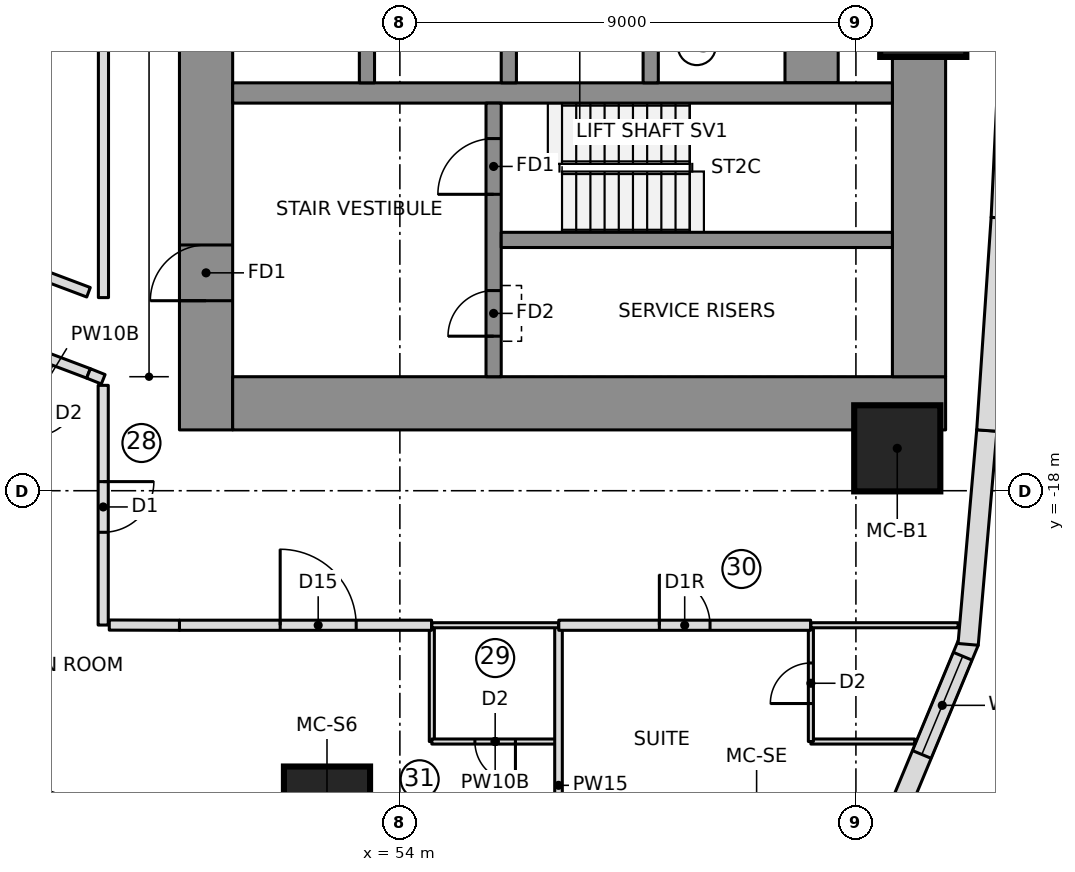
"""IFC4 building model, lengths in metres.
Left out: names, types, materials, properties, quantities, classifications, styles, units other than length and angle.
Written with IfcOpenShell. Run it as: python <this file> out.ifc"""

import sys

from ifc_helpers import new_model, si_unit, direction, frame, frame_2d, origin, origin_2d, place, context, subcontext, project, spatial, polyline, rectangle, outline, extrude, element, fill, save


model = new_model("IFC4")
c1 = context("Model", 3, precision=1e-05, world=origin(), true_north=direction((0.0, 1.0)))
c2 = subcontext(c1, "Body", "Model", "MODEL_VIEW")
j1 = project(units=[si_unit("LENGTHUNIT", "METRE"), si_unit("PLANEANGLEUNIT", "RADIAN")], contexts=[c1])
p1 = place(None, origin())
s1 = spatial("IfcSite", under=j1, at=p1, CompositionType="ELEMENT")
p2 = place(p1, origin())
s2 = spatial("IfcBuilding", under=s1, at=p2, CompositionType="ELEMENT")
p3 = place(p2, frame((0.0, 0.0, 109.75)))
s3 = spatial("IfcBuildingStorey", under=s2, at=p3, CompositionType="ELEMENT", Elevation=109.75)
p4 = place(p3, frame((50.175, -16.8, 0.0), z_axis=(0.0, 0.0, 1.0), x_axis=(0.0, 1.0, 0.0)))
e1 = element("IfcWall", 1, at=p4, inside=s3, PredefinedType="SHEAR", context=c2, shape_type="SweptSolid", body=[
    extrude(rectangle(XDim=10.15, YDim=1.05, at=frame_2d((5.075, 0.0))), origin(), (0.0, 0.0, 1.0), 3.55),
])
p5 = place(p4, frame((2.55, 0.0, 0.0)))
e2 = element("IfcOpeningElement", 2, at=p5, cuts=e1, PredefinedType="OPENING", context=c2, shape_type="SweptSolid", body=[
    extrude(rectangle(XDim=1.1, YDim=2.1, at=frame_2d((0.55, 1.05))), frame((0.0, 0.535, 0.0), z_axis=(0.0, -1.0, 0.0), x_axis=(1.0, 0.0, 0.0)), (0.0, 0.0, 1.0), 1.07),
])
p6 = place(p3, frame((50.7, -16.275, 0.0), z_axis=(0.0, 0.0, 1.0), x_axis=(1.0, 0.0, 0.0)))
e3 = element("IfcWall", 3, at=p6, inside=s3, PredefinedType="SHEAR", context=c2, shape_type="SweptSolid", body=[
    extrude(rectangle(XDim=14.07, YDim=1.05, at=frame_2d((7.035, 0.0))), origin(), (0.0, 0.0, 1.0), 3.55),
])
p7 = place(p3, frame((64.245, -15.75, 0.0), z_axis=(0.0, 0.0, 1.0), x_axis=(0.0, 1.0, 0.0)))
e4 = element("IfcWall", 4, at=p7, inside=s3, PredefinedType="SHEAR", context=c2, shape_type="SweptSolid", body=[
    extrude(rectangle(XDim=6.361, YDim=1.05, at=frame_2d((3.181, 0.0))), origin(), (0.0, 0.0, 1.0), 3.55),
])
p8 = place(p3, frame((62.125, -9.95, 0.0), z_axis=(0.0, 0.0, 1.0), x_axis=(0.0, 1.0, 0.0)))
e5 = element("IfcWall", 5, at=p8, inside=s3, PredefinedType="SHEAR", context=c2, shape_type="SweptSolid", body=[
    extrude(rectangle(XDim=19.9, YDim=1.05, at=frame_2d((9.95, 0.0))), origin(), (0.0, 0.0, 1.0), 3.55),
])
p9 = place(p3, frame((50.7, -10.15, 0.0), z_axis=(0.0, 0.0, 1.0), x_axis=(1.0, 0.0, 0.0)))
e6 = element("IfcWall", 6, at=p9, inside=s3, PredefinedType="SHEAR", context=c2, shape_type="SweptSolid", body=[
    extrude(rectangle(XDim=13.02, YDim=0.4, at=frame_2d((6.51, 0.0))), origin(), (0.0, 0.0, 1.0), 3.55),
])
for number, where, z_axis, x_axis in (
    (7, (53.35, -9.95, 0.0), (0.0, 0.0, 1.0), (0.0, 1.0, 0.0)),
    (8, (56.15, -9.95, 0.0), (0.0, 0.0, 1.0), (0.0, 1.0, 0.0)),
    (9, (58.95, -9.95, 0.0), (0.0, 0.0, 1.0), (0.0, 1.0, 0.0)),
):
    element("IfcWall", number, at=place(p3, frame(where, z_axis=z_axis, x_axis=x_axis)), inside=s3, PredefinedType="SHEAR", context=c2, shape_type="SweptSolid", body=[
        extrude(rectangle(XDim=3.0, YDim=0.3, at=frame_2d((1.5, 0.0))), origin(), (0.0, 0.0, 1.0), 3.55),
    ])
p10 = place(p3, frame((55.85, -15.75, 0.0), z_axis=(0.0, 0.0, 1.0), x_axis=(0.0, 1.0, 0.0)))
e10 = element("IfcWall", 10, at=p10, inside=s3, PredefinedType="SHEAR", context=c2, shape_type="SweptSolid", body=[
    extrude(rectangle(XDim=5.4, YDim=0.3, at=frame_2d((2.7, 0.0))), origin(), (0.0, 0.0, 1.0), 3.55),
])
p11 = place(p10, frame((3.6, 0.0, 0.0)))
e11 = element("IfcOpeningElement", 11, at=p11, cuts=e10, PredefinedType="OPENING", context=c2, shape_type="SweptSolid", body=[
    extrude(rectangle(XDim=1.1, YDim=2.1, at=frame_2d((0.55, 1.05))), frame((0.0, 0.16, 0.0), z_axis=(0.0, -1.0, 0.0), x_axis=(1.0, 0.0, 0.0)), (0.0, 0.0, 1.0), 0.32),
])
p12 = place(p10, frame((0.8, 0.0, 0.0)))
e12 = element("IfcOpeningElement", 12, at=p12, cuts=e10, PredefinedType="OPENING", context=c2, shape_type="SweptSolid", body=[
    extrude(rectangle(XDim=0.9, YDim=2.1, at=frame_2d((0.45, 1.05))), frame((0.0, 0.16, 0.0), z_axis=(0.0, -1.0, 0.0), x_axis=(1.0, 0.0, 0.0)), (0.0, 0.0, 1.0), 0.32),
])
p13 = place(p3, frame((56.0, -13.05, 0.0), z_axis=(0.0, 0.0, 1.0), x_axis=(1.0, 0.0, 0.0)))
e13 = element("IfcWall", 13, at=p13, inside=s3, PredefinedType="SHEAR", context=c2, shape_type="SweptSolid", body=[
    extrude(rectangle(XDim=7.72, YDim=0.3, at=frame_2d((3.86, 0.0))), origin(), (0.0, 0.0, 1.0), 3.55),
])
for number, where, z_axis, x_axis in (
    (14, (52.562, -24.293, 0.0), (0.0, 0.0, 1.0), (1.0, 0.0, 0.0)),
    (15, (63.816, -17.164, 0.0), (0.0, 0.0, 1.0), (1.0, 0.0, 0.0)),
    (16, (64.329, -8.589, 0.0), (0.0, 0.0, 1.0), (1.0, 0.0, 0.0)),
):
    element("IfcColumn", number, at=place(p3, frame(where, z_axis=z_axis, x_axis=x_axis)), inside=s3, PredefinedType="COLUMN", context=c2, shape_type="SweptSolid", body=[
        extrude(rectangle(XDim=1.7, YDim=1.7, at=origin_2d()), origin(), (0.0, 0.0, 1.0), 3.55),
    ])
p14 = place(p3, frame((63.59, -24.916, 0.0), z_axis=(0.0, 0.0, 1.0), x_axis=(0.383997751971, 0.923334027577, 0.0)))
e17 = element("IfcWall", 17, at=p14, inside=s3, PredefinedType="NOTDEFINED", context=c2, shape_type="SweptSolid", body=[
    extrude(outline(polyline([(-0.061, -0.2), (4.27, -0.2), (4.208, 0.2), (0.061, 0.2), (-0.061, -0.2)])), origin(), (0.0, 0.0, 1.0), 3.25),
])
p15 = place(p14, frame((1.852, 0.0, 0.6)))
e18 = element("IfcOpeningElement", 18, at=p15, cuts=e17, PredefinedType="OPENING", context=c2, shape_type="SweptSolid", body=[
    extrude(outline(polyline([(0.0, 1.4), (0.08, 1.802), (0.308, 2.142), (0.648, 2.37), (1.05, 2.45), (1.452, 2.37), (1.792, 2.142), (2.02, 1.802), (2.1, 1.4), (2.1, 1.05), (2.02, 0.648), (1.792, 0.308), (1.452, 0.08), (1.05, 0.0), (0.648, 0.08), (0.308, 0.308), (0.08, 0.648), (0.0, 1.05), (0.0, 1.4)])), frame((0.0, 0.21, 0.0), z_axis=(0.0, -1.0, 0.0), x_axis=(1.0, 0.0, 0.0)), (0.0, 0.0, 1.0), 0.42),
])
p16 = place(p3, frame((65.217, -21.002, 0.0), z_axis=(0.0, 0.0, 1.0), x_axis=(0.086992730434, 0.996208946382, 0.0)))
e19 = element("IfcWall", 19, at=p16, inside=s3, PredefinedType="NOTDEFINED", context=c2, shape_type="SweptSolid", body=[
    extrude(outline(polyline([(-0.031, -0.2), (4.209, -0.2), (4.205, 0.2), (0.031, 0.2), (-0.031, -0.2)])), origin(), (0.0, 0.0, 1.0), 3.25),
])
p17 = place(p3, frame((65.583, -16.811, 0.0), z_axis=(0.0, 0.0, 1.0), x_axis=(0.067724559895, 0.997704056315, 0.0)))
e20 = element("IfcWall", 20, at=p17, inside=s3, PredefinedType="NOTDEFINED", context=c2, shape_type="SweptSolid", body=[
    extrude(outline(polyline([(-0.002, -0.2), (4.209, -0.2), (4.205, 0.2), (0.002, 0.2), (-0.002, -0.2)])), origin(), (0.0, 0.0, 1.0), 3.25),
])
p18 = place(p3, frame((65.868, -12.614, 0.0), z_axis=(0.0, 0.0, 1.0), x_axis=(0.048342691508, 0.998830808585, 0.0)))
e21 = element("IfcWall", 21, at=p18, inside=s3, PredefinedType="NOTDEFINED", context=c2, shape_type="SweptSolid", body=[
    extrude(outline(polyline([(-0.002, -0.2), (4.209, -0.2), (4.205, 0.2), (0.002, 0.2), (-0.002, -0.2)])), origin(), (0.0, 0.0, 1.0), 3.25),
])
p19 = place(p3, frame((54.631, -22.95, 0.0), z_axis=(0.0, 0.0, 1.0), x_axis=(0.0, 1.0, 0.0)))
e22 = element("IfcWall", 22, at=p19, inside=s3, PredefinedType="PARTITIONING", context=c2, shape_type="SweptSolid", body=[
    extrude(rectangle(XDim=2.3, YDim=0.1, at=frame_2d((1.15, 0.0))), origin(), (0.0, 0.0, 1.0), 3.25),
])
p20 = place(p3, frame((57.131, -22.95, 0.0), z_axis=(0.0, 0.0, 1.0), x_axis=(-1.0, 0.0, 0.0)))
e23 = element("IfcWall", 23, at=p20, inside=s3, PredefinedType="PARTITIONING", context=c2, shape_type="SweptSolid", body=[
    extrude(rectangle(XDim=2.5, YDim=0.1, at=frame_2d((1.25, 0.0))), origin(), (0.0, 0.0, 1.0), 3.25),
])
p21 = place(p20, frame((0.85, 0.0, 0.0)))
e24 = element("IfcOpeningElement", 24, at=p21, cuts=e23, PredefinedType="OPENING", context=c2, shape_type="SweptSolid", body=[
    extrude(rectangle(XDim=0.8, YDim=2.1, at=frame_2d((0.4, 1.05))), frame((0.0, 0.06, 0.0), z_axis=(0.0, -1.0, 0.0), x_axis=(1.0, 0.0, 0.0)), (0.0, 0.0, 1.0), 0.12),
])
p22 = place(p3, frame((64.16, -22.95, 0.0), z_axis=(0.0, 0.0, 1.0), x_axis=(-1.0, 0.0, 0.0)))
e25 = element("IfcWall", 25, at=p22, inside=s3, PredefinedType="PARTITIONING", context=c2, shape_type="SweptSolid", body=[
    extrude(rectangle(XDim=2.049, YDim=0.1, at=frame_2d((1.025, 0.0))), origin(), (0.0, 0.0, 1.0), 3.25),
])
p23 = place(p3, frame((62.111, -22.95, 0.0), z_axis=(0.0, 0.0, 1.0), x_axis=(0.0, 1.0, 0.0)))
e26 = element("IfcWall", 26, at=p23, inside=s3, PredefinedType="PARTITIONING", context=c2, shape_type="SweptSolid", body=[
    extrude(rectangle(XDim=2.3, YDim=0.1, at=frame_2d((1.15, 0.0))), origin(), (0.0, 0.0, 1.0), 3.25),
])
p24 = place(p23, frame((0.75, 0.0, 0.0)))
e27 = element("IfcOpeningElement", 27, at=p24, cuts=e26, PredefinedType="OPENING", context=c2, shape_type="SweptSolid", body=[
    extrude(rectangle(XDim=0.8, YDim=2.1, at=frame_2d((0.4, 1.05))), frame((0.0, 0.06, 0.0), z_axis=(0.0, -1.0, 0.0), x_axis=(1.0, 0.0, 0.0)), (0.0, 0.0, 1.0), 0.12),
])
p25 = place(p3, frame((57.131, -26.979, 0.0), z_axis=(0.0, 0.0, 1.0), x_axis=(0.0, 1.0, 0.0)))
e28 = element("IfcWall", 28, at=p25, inside=s3, PredefinedType="PARTITIONING", context=c2, shape_type="SweptSolid", body=[
    extrude(rectangle(XDim=6.329, YDim=0.15, at=frame_2d((3.165, 0.0))), origin(), (0.0, 0.0, 1.0), 3.25),
])
p26 = place(p3, frame((47.122, -15.434, 0.0), z_axis=(0.0, 0.0, 1.0), x_axis=(-0.417409478396, -0.90871850831, 0.0)))
e29 = element("IfcWall", 29, at=p26, inside=s3, PredefinedType="PARTITIONING", context=c2, shape_type="SweptSolid", body=[
    extrude(rectangle(XDim=2.283, YDim=0.1, at=frame_2d((1.142, 0.0))), origin(), (0.0, 0.0, 1.0), 3.25),
])
p27 = place(p26, frame((0.75, 0.0, 0.0)))
e30 = element("IfcOpeningElement", 30, at=p27, cuts=e29, PredefinedType="OPENING", context=c2, shape_type="SweptSolid", body=[
    extrude(rectangle(XDim=0.8, YDim=2.1, at=frame_2d((0.4, 1.05))), frame((0.0, 0.06, 0.0), z_axis=(0.0, -1.0, 0.0), x_axis=(1.0, 0.0, 0.0)), (0.0, 0.0, 1.0), 0.12),
])
p28 = place(p3, frame((49.65, -20.655, 0.0), z_axis=(0.0, 0.0, 1.0), x_axis=(1.0, 0.0, 0.0)))
e31 = element("IfcWall", 31, at=p28, inside=s3, PredefinedType="PARTITIONING", context=c2, shape_type="SweptSolid", body=[
    extrude(rectangle(XDim=4.976, YDim=0.2, at=frame_2d((2.488, 0.0))), origin(), (0.0, 0.0, 1.0), 3.25),
])
p29 = place(p28, frame((1.988, 0.0, 0.0)))
e32 = element("IfcOpeningElement", 32, at=p29, cuts=e31, PredefinedType="OPENING", context=c2, shape_type="SweptSolid", body=[
    extrude(rectangle(XDim=1.5, YDim=2.1, at=frame_2d((0.75, 1.05))), frame((0.0, 0.11, 0.0), z_axis=(0.0, -1.0, 0.0), x_axis=(1.0, 0.0, 0.0)), (0.0, 0.0, 1.0), 0.22),
])
p30 = place(p3, frame((57.135, -20.655, 0.0), z_axis=(0.0, 0.0, 1.0), x_axis=(1.0, 0.0, 0.0)))
e33 = element("IfcWall", 33, at=p30, inside=s3, PredefinedType="PARTITIONING", context=c2, shape_type="SweptSolid", body=[
    extrude(rectangle(XDim=4.971, YDim=0.2, at=frame_2d((2.485, 0.0))), origin(), (0.0, 0.0, 1.0), 3.25),
])
p31 = place(p30, frame((1.985, 0.0, 0.0)))
e34 = element("IfcOpeningElement", 34, at=p31, cuts=e33, PredefinedType="OPENING", context=c2, shape_type="SweptSolid", body=[
    extrude(rectangle(XDim=1.0, YDim=2.1, at=frame_2d((0.5, 1.05))), frame((0.0, 0.11, 0.0), z_axis=(0.0, -1.0, 0.0), x_axis=(1.0, 0.0, 0.0)), (0.0, 0.0, 1.0), 0.22),
])
p32 = place(p3, frame((54.631, -20.655, 0.0), z_axis=(0.0, 0.0, 1.0), x_axis=(1.0, 0.0, 0.0)))
e35 = element("IfcWall", 35, at=p32, inside=s3, PredefinedType="PARTITIONING", context=c2, shape_type="SweptSolid", body=[
    extrude(rectangle(XDim=2.5, YDim=0.1, at=frame_2d((1.25, 0.0))), origin(), (0.0, 0.0, 1.0), 3.25),
])
p33 = place(p3, frame((62.111, -20.655, 0.0), z_axis=(0.0, 0.0, 1.0), x_axis=(1.0, 0.0, 0.0)))
e36 = element("IfcWall", 36, at=p33, inside=s3, PredefinedType="PARTITIONING", context=c2, shape_type="SweptSolid", body=[
    extrude(rectangle(XDim=2.906, YDim=0.1, at=frame_2d((1.453, 0.0))), origin(), (0.0, 0.0, 1.0), 3.25),
])
p34 = place(p3, frame((45.069, -14.634, 0.0), z_axis=(0.0, 0.0, 1.0), x_axis=(0.93564003724, -0.352955692282, 0.0)))
e37 = element("IfcWall", 37, at=p34, inside=s3, PredefinedType="PARTITIONING", context=c2, shape_type="SweptSolid", body=[
    extrude(rectangle(XDim=2.978, YDim=0.2, at=frame_2d((1.489, 0.0))), origin(), (0.0, 0.0, 1.0), 3.25),
])
p35 = place(p3, frame((47.855, -14.083, 0.0), z_axis=(0.0, 0.0, 1.0), x_axis=(-0.935907269358, 0.352246480696, 0.0)))
e38 = element("IfcWall", 38, at=p35, inside=s3, PredefinedType="PARTITIONING", context=c2, shape_type="SweptSolid", body=[
    extrude(rectangle(XDim=1.239, YDim=0.2, at=frame_2d((0.619, 0.0))), origin(), (0.0, 0.0, 1.0), 3.25),
])
p36 = place(p3, frame((48.15, 14.189, 0.0), z_axis=(0.0, 0.0, 1.0), x_axis=(0.0, -1.0, 0.0)))
e39 = element("IfcWall", 39, at=p36, inside=s3, PredefinedType="PARTITIONING", context=c2, shape_type="SweptSolid", body=[
    extrude(rectangle(XDim=28.377, YDim=0.2, at=frame_2d((14.189, 0.0))), origin(), (0.0, 0.0, 1.0), 3.25),
])
p37 = place(p3, frame((47.855, -15.685, 0.0), z_axis=(0.0, 0.0, 1.0), x_axis=(0.928638194287, -0.370986662983, 0.0)))
e40 = element("IfcWall", 40, at=p37, inside=s3, PredefinedType="PARTITIONING", context=c2, shape_type="SweptSolid", body=[
    extrude(rectangle(XDim=0.312, YDim=0.2, at=frame_2d((0.156, 0.0))), origin(), (0.0, 0.0, 1.0), 3.25),
])
p38 = place(p3, frame((48.145, -15.92, 0.0), z_axis=(0.0, 0.0, 1.0), x_axis=(-5.1610239e-05, -0.999999998668, 0.0)))
e41 = element("IfcWall", 41, at=p38, inside=s3, PredefinedType="PARTITIONING", context=c2, shape_type="SweptSolid", body=[
    extrude(rectangle(XDim=4.73, YDim=0.2, at=frame_2d((2.365, 0.0))), origin(), (0.0, 0.0, 1.0), 3.25),
])
p39 = place(p38, frame((1.9, 0.0, 0.0)))
e42 = element("IfcOpeningElement", 42, at=p39, cuts=e41, PredefinedType="OPENING", context=c2, shape_type="SweptSolid", body=[
    extrude(rectangle(XDim=1.0, YDim=2.1, at=frame_2d((0.5, 1.05))), frame((0.0, 0.11, 0.0), z_axis=(0.0, -1.0, 0.0), x_axis=(1.0, 0.0, 0.0)), (0.0, 0.0, 1.0), 0.22),
])
p40 = place(p3, frame((48.265, -20.651, 0.0), z_axis=(0.0, 0.0, 1.0), x_axis=(0.999996503144, -0.002644560569, 0.0)))
e43 = element("IfcWall", 43, at=p40, inside=s3, PredefinedType="PARTITIONING", context=c2, shape_type="SweptSolid", body=[
    extrude(rectangle(XDim=1.385, YDim=0.2, at=frame_2d((0.692, 0.0))), origin(), (0.0, 0.0, 1.0), 3.25),
])
p41 = place(p15, origin())
e44 = element("IfcWindow", 44, at=p41, inside=s3, PartitioningType="SINGLE_PANEL", PredefinedType="WINDOW", context=c2, shape_type="SweptSolid", body=[
    extrude(outline(polyline([(0.0, 1.4), (0.08, 1.802), (0.308, 2.142), (0.648, 2.37), (1.05, 2.45), (1.452, 2.37), (1.792, 2.142), (2.02, 1.802), (2.1, 1.4), (2.1, 1.05), (2.02, 0.648), (1.792, 0.308), (1.452, 0.08), (1.05, 0.0), (0.648, 0.08), (0.308, 0.308), (0.08, 0.648), (0.0, 1.05), (0.0, 1.4)])), frame((0.0, 0.17, 0.0), z_axis=(0.0, -1.0, 0.0), x_axis=(1.0, 0.0, 0.0)), (0.0, 0.0, 1.0), 0.06),
])
fill(e18, e44)
p42 = place(p21, origin())
e45 = element("IfcDoor", 45, at=p42, inside=s3, OperationType="SINGLE_SWING_LEFT", PredefinedType="DOOR", context=c2, shape_type="SweptSolid", body=[
    extrude(rectangle(XDim=0.8, YDim=2.1, at=frame_2d((0.4, 1.05))), frame((0.0, 0.025, 0.0), z_axis=(0.0, -1.0, 0.0), x_axis=(1.0, 0.0, 0.0)), (0.0, 0.0, 1.0), 0.05),
])
fill(e24, e45)
p43 = place(p24, origin())
e46 = element("IfcDoor", 46, at=p43, inside=s3, OperationType="SINGLE_SWING_LEFT", PredefinedType="DOOR", context=c2, shape_type="SweptSolid", body=[
    extrude(rectangle(XDim=0.8, YDim=2.1, at=frame_2d((0.4, 1.05))), frame((0.0, 0.025, 0.0), z_axis=(0.0, -1.0, 0.0), x_axis=(1.0, 0.0, 0.0)), (0.0, 0.0, 1.0), 0.05),
])
fill(e27, e46)
p44 = place(p29, origin())
e47 = element("IfcDoor", 47, at=p44, inside=s3, OperationType="DOUBLE_DOOR_SINGLE_SWING", PredefinedType="DOOR", context=c2, shape_type="SweptSolid", body=[
    extrude(rectangle(XDim=1.5, YDim=2.1, at=frame_2d((0.75, 1.05))), frame((0.0, 0.025, 0.0), z_axis=(0.0, -1.0, 0.0), x_axis=(1.0, 0.0, 0.0)), (0.0, 0.0, 1.0), 0.05),
])
fill(e32, e47)
p45 = place(p31, origin())
e48 = element("IfcDoor", 48, at=p45, inside=s3, OperationType="SINGLE_SWING_RIGHT", PredefinedType="DOOR", context=c2, shape_type="SweptSolid", body=[
    extrude(rectangle(XDim=1.0, YDim=2.1, at=frame_2d((0.5, 1.05))), frame((0.0, 0.025, 0.0), z_axis=(0.0, -1.0, 0.0), x_axis=(1.0, 0.0, 0.0)), (0.0, 0.0, 1.0), 0.05),
])
fill(e34, e48)
p46 = place(p39, origin())
e49 = element("IfcDoor", 49, at=p46, inside=s3, OperationType="SINGLE_SWING_LEFT", PredefinedType="DOOR", context=c2, shape_type="SweptSolid", body=[
    extrude(rectangle(XDim=1.0, YDim=2.1, at=frame_2d((0.5, 1.05))), frame((0.0, 0.025, 0.0), z_axis=(0.0, -1.0, 0.0), x_axis=(1.0, 0.0, 0.0)), (0.0, 0.0, 1.0), 0.05),
])
fill(e42, e49)
p47 = place(p11, origin())
e50 = element("IfcDoor", 50, at=p47, inside=s3, OperationType="SINGLE_SWING_RIGHT", PredefinedType="DOOR", context=c2, shape_type="SweptSolid", body=[
    extrude(rectangle(XDim=1.1, YDim=2.1, at=frame_2d((0.55, 1.05))), frame((0.0, 0.025, 0.0), z_axis=(0.0, -1.0, 0.0), x_axis=(1.0, 0.0, 0.0)), (0.0, 0.0, 1.0), 0.05),
])
fill(e11, e50)
p48 = place(p5, origin())
e51 = element("IfcDoor", 51, at=p48, inside=s3, OperationType="SINGLE_SWING_RIGHT", PredefinedType="DOOR", context=c2, shape_type="SweptSolid", body=[
    extrude(rectangle(XDim=1.1, YDim=2.1, at=frame_2d((0.55, 1.05))), frame((0.0, 0.025, 0.0), z_axis=(0.0, -1.0, 0.0), x_axis=(1.0, 0.0, 0.0)), (0.0, 0.0, 1.0), 0.05),
])
fill(e2, e51)
p49 = place(p12, origin())
e52 = element("IfcDoor", 52, at=p49, inside=s3, OperationType="SINGLE_SWING_LEFT", PredefinedType="DOOR", context=c2, shape_type="SweptSolid", body=[
    extrude(rectangle(XDim=0.9, YDim=2.1, at=frame_2d((0.45, 1.05))), frame((0.0, 0.025, 0.0), z_axis=(0.0, -1.0, 0.0), x_axis=(1.0, 0.0, 0.0)), (0.0, 0.0, 1.0), 0.05),
])
fill(e12, e52)
save(model, sys.argv[1])
